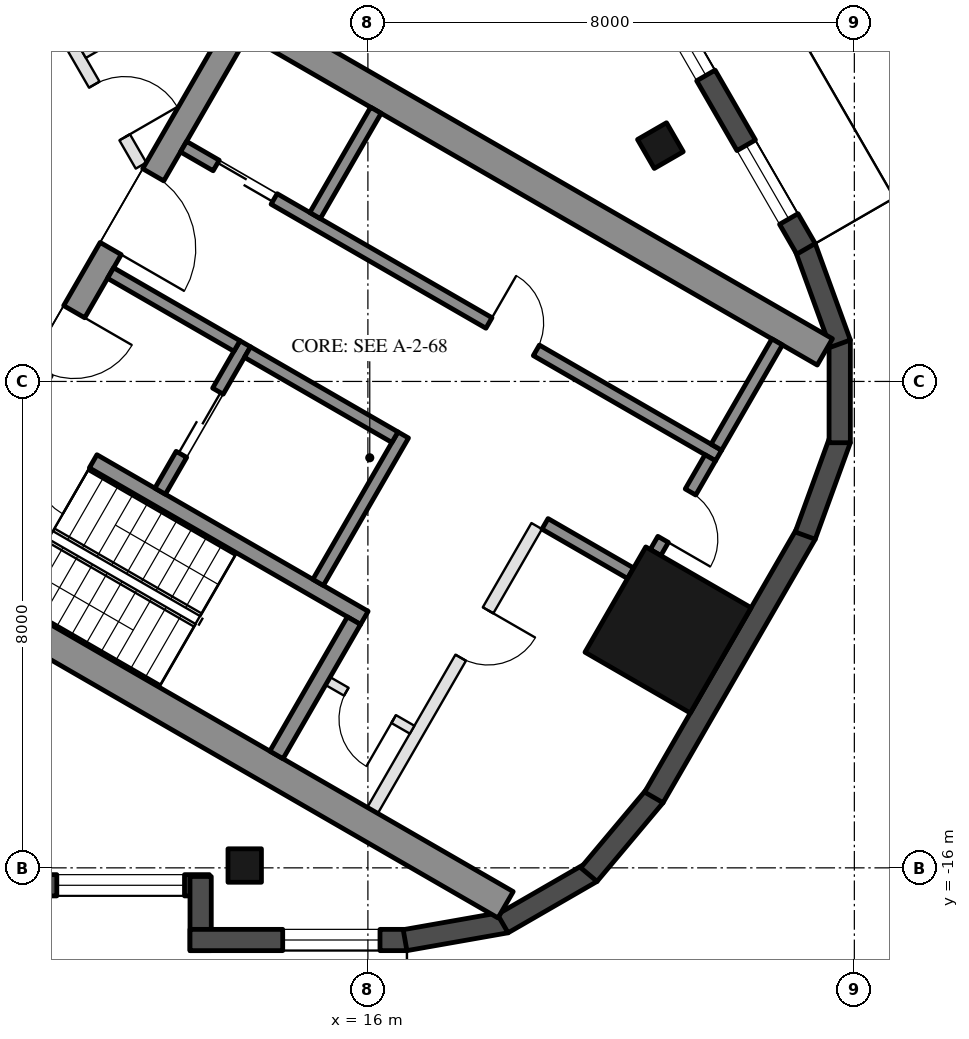
"""IFC4 building model, lengths in metres.
Left out: names, types, materials, properties, quantities, classifications, styles, units other than length and angle.
Written with IfcOpenShell. Run it as: python <this file> out.ifc"""

import sys

from ifc_helpers import new_model, si_unit, direction, frame, frame_2d, origin, origin_2d, place, context, subcontext, project, spatial, rectangle, hollow_rectangle, extrude, boolean, halfspace, element, fill, save


model = new_model("IFC4")
c1 = context("Model", 3, precision=1e-05, world=origin(), true_north=direction((0.0, 1.0)))
c2 = subcontext(c1, "Body", "Model", "MODEL_VIEW")
j1 = project(units=[si_unit("LENGTHUNIT", "METRE"), si_unit("PLANEANGLEUNIT", "RADIAN")], contexts=[c1])
p1 = place(None, origin())
s1 = spatial("IfcSite", under=j1, at=p1, CompositionType="ELEMENT")
p2 = place(p1, origin())
s2 = spatial("IfcBuilding", under=s1, at=p2, CompositionType="ELEMENT")
p3 = place(p2, frame((0.0, 0.0, 294.8)))
s3 = spatial("IfcBuildingStorey", under=s2, at=p3, CompositionType="ELEMENT", Elevation=294.8)
for number, where, z_axis, x_axis in (
    (1, (13.974, -15.962, 0.0), (0.0, 0.0, 1.0), (-1.0, 0.0, 0.0)),
    (2, (20.81, -4.121, 0.0), (0.0, 0.0, 1.0), (-0.5, 0.866, 0.0)),
):
    element("IfcColumn", number, at=place(p3, frame(where, z_axis=z_axis, x_axis=x_axis)), inside=s3, PredefinedType="COLUMN", context=c2, shape_type="SweptSolid", body=[
        boolean("DIFFERENCE", extrude(hollow_rectangle(XDim=0.55, YDim=0.55, WallThickness=0.025, at=origin_2d()), origin(), (0.0, 0.0, 1.0), 3.7), halfspace(frame((0.0, 0.0, 3.66), z_axis=(0.0, 0.0, 1.0), x_axis=(1.0, 0.0, 0.0)), False)),
    ])
p4 = place(p3, frame((20.936, -12.087, 0.0), z_axis=(0.0, 0.0, 1.0), x_axis=(0.5, 0.866025403784, 0.0)))
e3 = element("IfcColumn", 3, at=p4, inside=s3, PredefinedType="COLUMN", context=c2, shape_type="SweptSolid", body=[
    boolean("DIFFERENCE", extrude(hollow_rectangle(XDim=2.0, YDim=2.0, WallThickness=0.05, at=origin_2d()), origin(), (0.0, 0.0, 1.0), 3.7), halfspace(frame((0.0, 0.0, 3.587), z_axis=(0.0, 0.0, 1.0), x_axis=(1.0, 0.0, 0.0)), False)),
])
p5 = place(p3, frame((7.567, -16.287, 0.0), z_axis=(0.0, 0.0, 1.0), x_axis=(1.0, 0.0, 0.0)))
e4 = element("IfcWall", 4, at=p5, inside=s3, PredefinedType="SOLIDWALL", context=c2, shape_type="SweptSolid", body=[
    extrude(rectangle(XDim=5.827, YDim=0.35, at=frame_2d((2.914, 0.0))), origin(), (0.0, 0.0, 1.0), 3.55),
])
p6 = place(p5, frame((0.617, 0.0, 0.0)))
e5 = element("IfcOpeningElement", 5, at=p6, cuts=e4, PredefinedType="OPENING", context=c2, shape_type="SweptSolid", body=[
    extrude(rectangle(XDim=2.4, YDim=2.4, at=frame_2d((1.2, 1.2))), frame((0.0, 0.185, 0.0), z_axis=(0.0, -1.0, 0.0), x_axis=(1.0, 0.0, 0.0)), (0.0, 0.0, 1.0), 0.37),
])
p7 = place(p5, frame((3.317, 0.0, 0.3)))
e6 = element("IfcOpeningElement", 6, at=p7, cuts=e4, PredefinedType="OPENING", context=c2, shape_type="SweptSolid", body=[
    extrude(rectangle(XDim=2.1, YDim=2.65, at=frame_2d((1.05, 1.325))), frame((0.0, 0.185, 0.0), z_axis=(0.0, -1.0, 0.0), x_axis=(1.0, 0.0, 0.0)), (0.0, 0.0, 1.0), 0.37),
])
p8 = place(p3, frame((13.249, -16.142, 0.0), z_axis=(0.0, 0.0, 1.0), x_axis=(0.0, -1.0, 0.0)))
e7 = element("IfcWall", 7, at=p8, inside=s3, PredefinedType="SOLIDWALL", context=c2, shape_type="SweptSolid", body=[
    extrude(rectangle(XDim=1.22, YDim=0.35, at=frame_2d((0.61, 0.0))), origin(), (0.0, 0.0, 1.0), 3.55),
])
p9 = place(p3, frame((13.074, -17.187, 0.0), z_axis=(0.0, 0.0, 1.0), x_axis=(1.0, 0.0, 0.0)))
e8 = element("IfcWall", 8, at=p9, inside=s3, PredefinedType="SOLIDWALL", context=c2, shape_type="SweptSolid", body=[
    extrude(rectangle(XDim=3.567, YDim=0.35, at=frame_2d((1.784, 0.0))), origin(), (0.0, 0.0, 1.0), 3.55),
])
p10 = place(p9, frame((1.525, 0.0, 0.3)))
e9 = element("IfcOpeningElement", 9, at=p10, cuts=e8, PredefinedType="OPENING", context=c2, shape_type="SweptSolid", body=[
    extrude(rectangle(XDim=1.6, YDim=2.65, at=frame_2d((0.8, 1.325))), frame((0.0, 0.185, 0.0), z_axis=(0.0, -1.0, 0.0), x_axis=(1.0, 0.0, 0.0)), (0.0, 0.0, 1.0), 0.37),
])
for number, where, z_axis, x_axis in (
    (10, (16.611, -17.189, 0.0), (0.0, 0.0, 1.0), (0.985, 0.174, 0.0)),
    (11, (18.218, -16.917, 0.0), (0.0, 0.0, 1.0), (0.866, 0.5, 0.0)),
):
    element("IfcWall", number, at=place(p3, frame(where, z_axis=z_axis, x_axis=x_axis)), inside=s3, PredefinedType="SOLIDWALL", context=c2, shape_type="SweptSolid", body=[
        extrude(rectangle(XDim=1.689, YDim=0.35, at=frame_2d((0.845, 0.0))), origin(), (0.0, 0.0, 1.0), 3.55),
    ])
p11 = place(p3, frame((19.635, -16.111, 0.0), z_axis=(0.0, 0.0, 1.0), x_axis=(0.642697100627, 0.766120380127, 0.0)))
e12 = element("IfcWall", 12, at=p11, inside=s3, PredefinedType="SOLIDWALL", context=c2, shape_type="SweptSolid", body=[
    extrude(rectangle(XDim=1.689, YDim=0.35, at=frame_2d((0.845, 0.0))), origin(), (0.0, 0.0, 1.0), 3.55),
])
p12 = place(p3, frame((20.703, -14.842, 0.0), z_axis=(0.0, 0.0, 1.0), x_axis=(0.500016662025, 0.866015783746, 0.0)))
e13 = element("IfcWall", 13, at=p12, inside=s3, PredefinedType="SOLIDWALL", context=c2, shape_type="SweptSolid", body=[
    extrude(rectangle(XDim=5.004, YDim=0.35, at=frame_2d((2.502, 0.0))), origin(), (0.0, 0.0, 1.0), 3.55),
])
for number, where, z_axis, x_axis in (
    (14, (23.192, -10.536, 0.0), (0.0, 0.0, 1.0), (0.342, 0.94, 0.0)),
    (15, (23.759, -9.008, 0.0), (0.0, 0.0, 1.0), (0.0, 1.0, 0.0)),
    (16, (23.77, -7.379, 0.0), (0.0, 0.0, 1.0), (-0.342, 0.94, 0.0)),
):
    element("IfcWall", number, at=place(p3, frame(where, z_axis=z_axis, x_axis=x_axis)), inside=s3, PredefinedType="SOLIDWALL", context=c2, shape_type="SweptSolid", body=[
        extrude(rectangle(XDim=1.689, YDim=0.35, at=frame_2d((0.845, 0.0))), origin(), (0.0, 0.0, 1.0), 3.55),
    ])
p13 = place(p3, frame((23.205, -5.819, 0.0), z_axis=(0.0, 0.0, 1.0), x_axis=(-0.500010118922, 0.866019561543, 0.0)))
e17 = element("IfcWall", 17, at=p13, inside=s3, PredefinedType="SOLIDWALL", context=c2, shape_type="SweptSolid", body=[
    extrude(rectangle(XDim=10.554, YDim=0.35, at=frame_2d((5.277, 0.0))), origin(), (0.0, 0.0, 1.0), 3.55),
])
p14 = place(p13, frame((0.566, 0.0, 0.3)))
e18 = element("IfcOpeningElement", 18, at=p14, cuts=e17, PredefinedType="OPENING", context=c2, shape_type="SweptSolid", body=[
    extrude(rectangle(XDim=1.4, YDim=2.65, at=frame_2d((0.7, 1.325))), frame((0.0, 0.185, 0.0), z_axis=(0.0, -1.0, 0.0), x_axis=(1.0, 0.0, 0.0)), (0.0, 0.0, 1.0), 0.37),
])
p15 = place(p13, frame((6.63, 0.0, 0.0)))
e19 = element("IfcOpeningElement", 19, at=p15, cuts=e17, PredefinedType="OPENING", context=c2, shape_type="SweptSolid", body=[
    extrude(rectangle(XDim=2.4, YDim=2.4, at=frame_2d((1.2, 1.2))), frame((0.0, 0.185, 0.0), z_axis=(0.0, -1.0, 0.0), x_axis=(1.0, 0.0, 0.0)), (0.0, 0.0, 1.0), 0.37),
])
p16 = place(p13, frame((3.292, 0.0, 0.3)))
e20 = element("IfcOpeningElement", 20, at=p16, cuts=e17, PredefinedType="OPENING", context=c2, shape_type="SweptSolid", body=[
    extrude(rectangle(XDim=3.0, YDim=2.65, at=frame_2d((1.5, 1.325))), frame((0.0, 0.185, 0.0), z_axis=(0.0, -1.0, 0.0), x_axis=(1.0, 0.0, 0.0)), (0.0, 0.0, 1.0), 0.37),
])
for number, where, z_axis, x_axis in (
    (21, (8.547, -10.997, 0.0), (0.0, 0.0, 1.0), (0.866, -0.5, 0.0)),
    (22, (13.797, -1.903, 0.0), (0.0, 0.0, 1.0), (0.866, -0.5, 0.0)),
):
    element("IfcWall", number, at=place(p3, frame(where, z_axis=z_axis, x_axis=x_axis)), inside=s3, PredefinedType="SHEAR", context=c2, shape_type="SweptSolid", body=[
        extrude(rectangle(XDim=11.222, YDim=0.5, at=frame_2d((5.611, 0.0))), origin(), (0.0, 0.0, 1.0), 3.5),
    ])
p17 = place(p3, frame((8.845, -10.88, 0.0), z_axis=(0.0, 0.0, 1.0), x_axis=(0.500004234368, 0.866022959057, 0.0)))
e23 = element("IfcWall", 23, at=p17, inside=s3, PredefinedType="SHEAR", context=c2, shape_type="SweptSolid", body=[
    extrude(rectangle(XDim=10.0, YDim=0.4, at=frame_2d((5.0, 0.0))), origin(), (0.0, 0.0, 1.0), 3.5),
])
p18 = place(p17, frame((3.55, 0.0, 0.0)))
e24 = element("IfcOpeningElement", 24, at=p18, cuts=e23, PredefinedType="OPENING", context=c2, shape_type="SweptSolid", body=[
    extrude(rectangle(XDim=1.1, YDim=2.1, at=frame_2d((0.55, 1.05))), frame((0.0, 0.21, 0.0), z_axis=(0.0, -1.0, 0.0), x_axis=(1.0, 0.0, 0.0)), (0.0, 0.0, 1.0), 0.42),
])
p19 = place(p17, frame((5.85, 0.0, 0.0)))
e25 = element("IfcOpeningElement", 25, at=p19, cuts=e23, PredefinedType="OPENING", context=c2, shape_type="SweptSolid", body=[
    extrude(rectangle(XDim=1.4, YDim=2.1, at=frame_2d((0.7, 1.05))), frame((0.0, 0.21, 0.0), z_axis=(0.0, -1.0, 0.0), x_axis=(1.0, 0.0, 0.0)), (0.0, 0.0, 1.0), 0.42),
])
p20 = place(p3, frame((10.356, -8.664, 0.0), z_axis=(0.0, 0.0, 1.0), x_axis=(0.866028629588, -0.499994412703, 0.0)))
e26 = element("IfcWall", 26, at=p20, inside=s3, PredefinedType="SHEAR", context=c2, shape_type="SweptSolid", body=[
    extrude(rectangle(XDim=6.45, YDim=0.25, at=frame_2d((3.225, 0.0))), origin(), (0.0, 0.0, 1.0), 3.5),
])
p21 = place(p20, frame((0.3, 0.0, 0.0)))
e27 = element("IfcOpeningElement", 27, at=p21, cuts=e26, PredefinedType="OPENING", context=c2, shape_type="SweptSolid", body=[
    extrude(rectangle(XDim=1.0, YDim=2.1, at=frame_2d((0.5, 1.05))), frame((0.0, 0.135, 0.0), z_axis=(0.0, -1.0, 0.0), x_axis=(1.0, 0.0, 0.0)), (0.0, 0.0, 1.0), 0.27),
])
p22 = place(p3, frame((14.496, -14.143, 0.0), z_axis=(0.0, 0.0, 1.0), x_axis=(0.500062241894, 0.865989465428, 0.0)))
e28 = element("IfcWall", 28, at=p22, inside=s3, PredefinedType="SHEAR", context=c2, shape_type="SweptSolid", body=[
    extrude(rectangle(XDim=2.55, YDim=0.25, at=frame_2d((1.275, 0.0))), origin(), (0.0, 0.0, 1.0), 3.5),
])
p23 = place(p3, frame((15.181, -11.305, 0.0), z_axis=(0.0, 0.0, 1.0), x_axis=(0.49994636267, 0.866056369097, 0.0)))
e29 = element("IfcWall", 29, at=p23, inside=s3, PredefinedType="SHEAR", context=c2, shape_type="SweptSolid", body=[
    extrude(rectangle(XDim=2.8, YDim=0.2, at=frame_2d((1.4, 0.0))), origin(), (0.0, 0.0, 1.0), 3.5),
])
p24 = place(p3, frame((12.583, -9.805, 0.0), z_axis=(0.0, 0.0, 1.0), x_axis=(0.49994636267, 0.866056369097, 0.0)))
e30 = element("IfcWall", 30, at=p24, inside=s3, PredefinedType="SHEAR", context=c2, shape_type="SweptSolid", body=[
    extrude(rectangle(XDim=2.8, YDim=0.2, at=frame_2d((1.4, 0.0))), origin(), (0.0, 0.0, 1.0), 3.5),
])
p25 = place(p24, frame((0.7, 0.0, 0.0)))
e31 = element("IfcOpeningElement", 31, at=p25, cuts=e30, PredefinedType="OPENING", context=c2, shape_type="SweptSolid", body=[
    extrude(rectangle(XDim=1.2, YDim=2.1, at=frame_2d((0.6, 1.05))), frame((0.0, 0.11, 0.0), z_axis=(0.0, -1.0, 0.0), x_axis=(1.0, 0.0, 0.0)), (0.0, 0.0, 1.0), 0.22),
])
p26 = place(p3, frame((11.768, -6.217, 0.0), z_axis=(0.0, 0.0, 1.0), x_axis=(0.866050077142, -0.499957262057, 0.0)))
e32 = element("IfcWall", 32, at=p26, inside=s3, PredefinedType="SHEAR", context=c2, shape_type="SweptSolid", body=[
    extrude(rectangle(XDim=2.4, YDim=0.2, at=frame_2d((1.2, 0.0))), origin(), (0.0, 0.0, 1.0), 3.5),
])
p27 = place(p3, frame((14.02, -7.517, 0.0), z_axis=(0.0, 0.0, 1.0), x_axis=(0.866034573852, -0.49998411664, 0.0)))
e33 = element("IfcWall", 33, at=p27, inside=s3, PredefinedType="SHEAR", context=c2, shape_type="SweptSolid", body=[
    extrude(rectangle(XDim=2.8, YDim=0.2, at=frame_2d((1.4, 0.0))), origin(), (0.0, 0.0, 1.0), 3.5),
])
p28 = place(p3, frame((12.968, -4.138, 0.0), z_axis=(0.0, 0.0, 1.0), x_axis=(0.866028328073, -0.49999493495, 0.0)))
e34 = element("IfcWall", 34, at=p28, inside=s3, PredefinedType="SHEAR", context=c2, shape_type="SweptSolid", body=[
    extrude(rectangle(XDim=10.16, YDim=0.2, at=frame_2d((5.08, 0.0))), origin(), (0.0, 0.0, 1.0), 3.5),
])
p29 = place(p28, frame((0.62, 0.0, 0.0)))
e35 = element("IfcOpeningElement", 35, at=p29, cuts=e34, PredefinedType="OPENING", context=c2, shape_type="SweptSolid", body=[
    extrude(rectangle(XDim=1.1, YDim=2.1, at=frame_2d((0.55, 1.05))), frame((0.0, 0.11, 0.0), z_axis=(0.0, -1.0, 0.0), x_axis=(1.0, 0.0, 0.0)), (0.0, 0.0, 1.0), 0.22),
])
p30 = place(p28, frame((5.8, 0.0, 0.0)))
e36 = element("IfcOpeningElement", 36, at=p30, cuts=e34, PredefinedType="OPENING", context=c2, shape_type="SweptSolid", body=[
    extrude(rectangle(XDim=0.9, YDim=2.1, at=frame_2d((0.45, 1.05))), frame((0.0, 0.11, 0.0), z_axis=(0.0, -1.0, 0.0), x_axis=(1.0, 0.0, 0.0)), (0.0, 0.0, 1.0), 0.22),
])
p31 = place(p3, frame((20.73, -10.814, 0.0), z_axis=(0.0, 0.0, 1.0), x_axis=(0.499961193289, 0.866047807691, 0.0)))
e37 = element("IfcWall", 37, at=p31, inside=s3, PredefinedType="SHEAR", context=c2, shape_type="SweptSolid", body=[
    extrude(rectangle(XDim=1.8, YDim=0.2, at=frame_2d((0.9, 0.0))), origin(), (0.0, 0.0, 1.0), 3.5),
])
p32 = place(p31, frame((0.25, 0.0, 0.0)))
e38 = element("IfcOpeningElement", 38, at=p32, cuts=e37, PredefinedType="OPENING", context=c2, shape_type="SweptSolid", body=[
    extrude(rectangle(XDim=0.9, YDim=2.1, at=frame_2d((0.45, 1.05))), frame((0.0, 0.11, 0.0), z_axis=(0.0, -1.0, 0.0), x_axis=(1.0, 0.0, 0.0)), (0.0, 0.0, 1.0), 0.22),
])
p33 = place(p3, frame((18.913, -10.342, 0.0), z_axis=(0.0, 0.0, 1.0), x_axis=(0.866053003207, -0.499952193351, 0.0)))
e39 = element("IfcWall", 39, at=p33, inside=s3, PredefinedType="SHEAR", context=c2, shape_type="SweptSolid", body=[
    extrude(rectangle(XDim=1.625, YDim=0.2, at=frame_2d((0.812, 0.0))), origin(), (0.0, 0.0, 1.0), 3.5),
])
for number, where, z_axis, x_axis in (
    (40, (15.131, -5.272, 0.0), (0.0, 0.0, 1.0), (0.5, 0.866, 0.0)),
    (41, (21.73, -9.082, 0.0), (0.0, 0.0, 1.0), (0.5, 0.866, 0.0)),
):
    element("IfcWall", number, at=place(p3, frame(where, z_axis=z_axis, x_axis=x_axis)), inside=s3, PredefinedType="SHEAR", context=c2, shape_type="SweptSolid", body=[
        extrude(rectangle(XDim=2.0, YDim=0.2, at=frame_2d((1.0, 0.0))), origin(), (0.0, 0.0, 1.0), 3.5),
    ])
p34 = place(p3, frame((16.076, -15.055, 0.0), z_axis=(0.0, 0.0, 1.0), x_axis=(0.499995103361, 0.866028230842, 0.0)))
e42 = element("IfcWall", 42, at=p34, inside=s3, PredefinedType="PARTITIONING", context=c2, shape_type="SweptSolid", body=[
    extrude(rectangle(XDim=5.4, YDim=0.2, at=frame_2d((2.7, 0.0))), origin(), (0.0, 0.0, 1.0), 3.5),
])
p35 = place(p34, frame((2.9, 0.0, 0.0)))
e43 = element("IfcOpeningElement", 43, at=p35, cuts=e42, PredefinedType="OPENING", context=c2, shape_type="SweptSolid", body=[
    extrude(rectangle(XDim=0.9, YDim=2.1, at=frame_2d((0.45, 1.05))), frame((0.0, 0.11, 0.0), z_axis=(0.0, -1.0, 0.0), x_axis=(1.0, 0.0, 0.0)), (0.0, 0.0, 1.0), 0.22),
])
p36 = place(p3, frame((15.342, -12.928, 0.0), z_axis=(0.0, 0.0, 1.0), x_axis=(0.865989903783, -0.500061482766, 0.0)))
e44 = element("IfcWall", 44, at=p36, inside=s3, PredefinedType="PARTITIONING", context=c2, shape_type="SweptSolid", body=[
    extrude(rectangle(XDim=1.6, YDim=0.15, at=frame_2d((0.8, 0.0))), origin(), (0.0, 0.0, 1.0), 3.5),
])
p37 = place(p36, frame((0.35, 0.0, 0.0)))
e45 = element("IfcOpeningElement", 45, at=p37, cuts=e44, PredefinedType="OPENING", context=c2, shape_type="SweptSolid", body=[
    extrude(rectangle(XDim=0.9, YDim=2.1, at=frame_2d((0.45, 1.05))), frame((0.0, 0.085, 0.0), z_axis=(0.0, -1.0, 0.0), x_axis=(1.0, 0.0, 0.0)), (0.0, 0.0, 1.0), 0.17),
])
p38 = place(p3, frame((10.269, -0.986, 0.0), z_axis=(0.0, 0.0, 1.0), x_axis=(0.50004472278, -0.865999581536, 0.0)))
e46 = element("IfcWall", 46, at=p38, inside=s3, PredefinedType="PARTITIONING", context=c2, shape_type="SweptSolid", body=[
    extrude(rectangle(XDim=4.0, YDim=0.2, at=frame_2d((2.0, 0.0))), origin(), (0.0, 0.0, 1.0), 3.05),
])
p39 = place(p38, frame((2.463, 0.0, 0.0)))
e47 = element("IfcOpeningElement", 47, at=p39, cuts=e46, PredefinedType="OPENING", context=c2, shape_type="SweptSolid", body=[
    extrude(rectangle(XDim=1.0, YDim=2.1, at=frame_2d((0.5, 1.05))), frame((0.0, 0.11, 0.0), z_axis=(0.0, -1.0, 0.0), x_axis=(1.0, 0.0, 0.0)), (0.0, 0.0, 1.0), 0.22),
])
p40 = place(p3, frame((11.324, -2.614, 0.0), z_axis=(0.0, 0.0, 1.0), x_axis=(0.866034573852, 0.49998411664, 0.0)))
e48 = element("IfcWall", 48, at=p40, inside=s3, PredefinedType="PARTITIONING", context=c2, shape_type="SweptSolid", body=[
    extrude(rectangle(XDim=2.8, YDim=0.15, at=frame_2d((1.4, 0.0))), origin(), (0.0, 0.0, 1.0), 3.55),
])
p41 = place(p40, frame((1.4, 0.0, 0.0)))
e49 = element("IfcOpeningElement", 49, at=p41, cuts=e48, PredefinedType="OPENING", context=c2, shape_type="SweptSolid", body=[
    extrude(rectangle(XDim=0.9, YDim=2.1, at=frame_2d((0.45, 1.05))), frame((0.0, 0.085, 0.0), z_axis=(0.0, -1.0, 0.0), x_axis=(1.0, 0.0, 0.0)), (0.0, 0.0, 1.0), 0.17),
])
p42 = place(p7, origin())
e50 = element("IfcWindow", 50, at=p42, inside=s3, PartitioningType="SINGLE_PANEL", PredefinedType="WINDOW", context=c2, shape_type="SweptSolid", body=[
    extrude(rectangle(XDim=2.1, YDim=2.65, at=frame_2d((1.05, 1.325))), frame((0.0, 0.03, 0.0), z_axis=(0.0, -1.0, 0.0), x_axis=(1.0, 0.0, 0.0)), (0.0, 0.0, 1.0), 0.06),
])
fill(e6, e50)
p43 = place(p10, origin())
e51 = element("IfcWindow", 51, at=p43, inside=s3, PartitioningType="SINGLE_PANEL", PredefinedType="WINDOW", context=c2, shape_type="SweptSolid", body=[
    extrude(rectangle(XDim=1.6, YDim=2.65, at=frame_2d((0.8, 1.325))), frame((0.0, 0.03, 0.0), z_axis=(0.0, -1.0, 0.0), x_axis=(1.0, 0.0, 0.0)), (0.0, 0.0, 1.0), 0.06),
])
fill(e9, e51)
p44 = place(p14, origin())
e52 = element("IfcWindow", 52, at=p44, inside=s3, PartitioningType="SINGLE_PANEL", PredefinedType="WINDOW", context=c2, shape_type="SweptSolid", body=[
    extrude(rectangle(XDim=1.4, YDim=2.65, at=frame_2d((0.7, 1.325))), frame((0.0, 0.03, 0.0), z_axis=(0.0, -1.0, 0.0), x_axis=(1.0, 0.0, 0.0)), (0.0, 0.0, 1.0), 0.06),
])
fill(e18, e52)
p45 = place(p16, origin())
e53 = element("IfcWindow", 53, at=p45, inside=s3, PartitioningType="SINGLE_PANEL", PredefinedType="WINDOW", context=c2, shape_type="SweptSolid", body=[
    extrude(rectangle(XDim=3.0, YDim=2.65, at=frame_2d((1.5, 1.325))), frame((0.0, 0.03, 0.0), z_axis=(0.0, -1.0, 0.0), x_axis=(1.0, 0.0, 0.0)), (0.0, 0.0, 1.0), 0.06),
])
fill(e20, e53)
p46 = place(p25, origin())
e54 = element("IfcDoor", 54, at=p46, inside=s3, OperationType="DOUBLE_DOOR_SLIDING", PredefinedType="DOOR", context=c2, shape_type="SweptSolid", body=[
    extrude(rectangle(XDim=1.2, YDim=2.1, at=frame_2d((0.6, 1.05))), frame((0.0, 0.025, 0.0), z_axis=(0.0, -1.0, 0.0), x_axis=(1.0, 0.0, 0.0)), (0.0, 0.0, 1.0), 0.05),
])
fill(e31, e54)
p47 = place(p37, frame((0.9, 0.0, 0.0), z_axis=(0.0, 0.0, 1.0), x_axis=(-1.0, 0.0, 0.0)))
e55 = element("IfcDoor", 55, at=p47, inside=s3, OperationType="SINGLE_SWING_LEFT", PredefinedType="DOOR", context=c2, shape_type="SweptSolid", body=[
    extrude(rectangle(XDim=0.9, YDim=2.1, at=frame_2d((0.45, 1.05))), frame((0.0, 0.025, 0.0), z_axis=(0.0, -1.0, 0.0), x_axis=(1.0, 0.0, 0.0)), (0.0, 0.0, 1.0), 0.05),
])
fill(e45, e55)
p48 = place(p29, origin())
e56 = element("IfcDoor", 56, at=p48, inside=s3, OperationType="DOUBLE_DOOR_SLIDING", PredefinedType="DOOR", context=c2, shape_type="SweptSolid", body=[
    extrude(rectangle(XDim=1.1, YDim=2.1, at=frame_2d((0.55, 1.05))), frame((0.0, 0.025, 0.0), z_axis=(0.0, -1.0, 0.0), x_axis=(1.0, 0.0, 0.0)), (0.0, 0.0, 1.0), 0.05),
])
fill(e35, e56)
p49 = place(p30, origin())
e57 = element("IfcDoor", 57, at=p49, inside=s3, OperationType="SINGLE_SWING_LEFT", PredefinedType="DOOR", context=c2, shape_type="SweptSolid", body=[
    extrude(rectangle(XDim=0.9, YDim=2.1, at=frame_2d((0.45, 1.05))), frame((0.0, 0.025, 0.0), z_axis=(0.0, -1.0, 0.0), x_axis=(1.0, 0.0, 0.0)), (0.0, 0.0, 1.0), 0.05),
])
fill(e36, e57)
p50 = place(p32, frame((0.9, 0.0, 0.0), z_axis=(0.0, 0.0, 1.0), x_axis=(-1.0, 0.0, 0.0)))
e58 = element("IfcDoor", 58, at=p50, inside=s3, OperationType="SINGLE_SWING_RIGHT", PredefinedType="DOOR", context=c2, shape_type="SweptSolid", body=[
    extrude(rectangle(XDim=0.9, YDim=2.1, at=frame_2d((0.45, 1.05))), frame((0.0, 0.025, 0.0), z_axis=(0.0, -1.0, 0.0), x_axis=(1.0, 0.0, 0.0)), (0.0, 0.0, 1.0), 0.05),
])
fill(e38, e58)
p51 = place(p35, frame((0.9, 0.0, 0.0), z_axis=(0.0, 0.0, 1.0), x_axis=(-1.0, 0.0, 0.0)))
e59 = element("IfcDoor", 59, at=p51, inside=s3, OperationType="SINGLE_SWING_LEFT", PredefinedType="DOOR", context=c2, shape_type="SweptSolid", body=[
    extrude(rectangle(XDim=0.9, YDim=2.1, at=frame_2d((0.45, 1.05))), frame((0.0, 0.025, 0.0), z_axis=(0.0, -1.0, 0.0), x_axis=(1.0, 0.0, 0.0)), (0.0, 0.0, 1.0), 0.05),
])
fill(e43, e59)
p52 = place(p18, frame((1.1, 0.0, 0.0), z_axis=(0.0, 0.0, 1.0), x_axis=(-1.0, 0.0, 0.0)))
e60 = element("IfcDoor", 60, at=p52, inside=s3, OperationType="SINGLE_SWING_LEFT", PredefinedType="DOOR", context=c2, shape_type="SweptSolid", body=[
    extrude(rectangle(XDim=1.1, YDim=2.1, at=frame_2d((0.55, 1.05))), frame((0.0, 0.025, 0.0), z_axis=(0.0, -1.0, 0.0), x_axis=(1.0, 0.0, 0.0)), (0.0, 0.0, 1.0), 0.05),
])
fill(e24, e60)
p53 = place(p19, frame((1.4, 0.0, 0.0), z_axis=(0.0, 0.0, 1.0), x_axis=(-1.0, 0.0, 0.0)))
e61 = element("IfcDoor", 61, at=p53, inside=s3, OperationType="DOUBLE_DOOR_SINGLE_SWING", PredefinedType="DOOR", context=c2, shape_type="SweptSolid", body=[
    extrude(rectangle(XDim=1.4, YDim=2.1, at=frame_2d((0.7, 1.05))), frame((0.0, 0.025, 0.0), z_axis=(0.0, -1.0, 0.0), x_axis=(1.0, 0.0, 0.0)), (0.0, 0.0, 1.0), 0.05),
])
fill(e25, e61)
p54 = place(p21, frame((1.0, 0.0, 0.0), z_axis=(0.0, 0.0, 1.0), x_axis=(-1.0, 0.0, 0.0)))
e62 = element("IfcDoor", 62, at=p54, inside=s3, OperationType="SINGLE_SWING_LEFT", PredefinedType="DOOR", context=c2, shape_type="SweptSolid", body=[
    extrude(rectangle(XDim=1.0, YDim=2.1, at=frame_2d((0.5, 1.05))), frame((0.0, 0.025, 0.0), z_axis=(0.0, -1.0, 0.0), x_axis=(1.0, 0.0, 0.0)), (0.0, 0.0, 1.0), 0.05),
])
fill(e27, e62)
p55 = place(p39, origin())
e63 = element("IfcDoor", 63, at=p55, inside=s3, OperationType="SINGLE_SWING_RIGHT", PredefinedType="DOOR", context=c2, shape_type="SweptSolid", body=[
    extrude(rectangle(XDim=1.0, YDim=2.1, at=frame_2d((0.5, 1.05))), frame((0.0, 0.025, 0.0), z_axis=(0.0, -1.0, 0.0), x_axis=(1.0, 0.0, 0.0)), (0.0, 0.0, 1.0), 0.05),
])
fill(e47, e63)
save(model, sys.argv[1])
